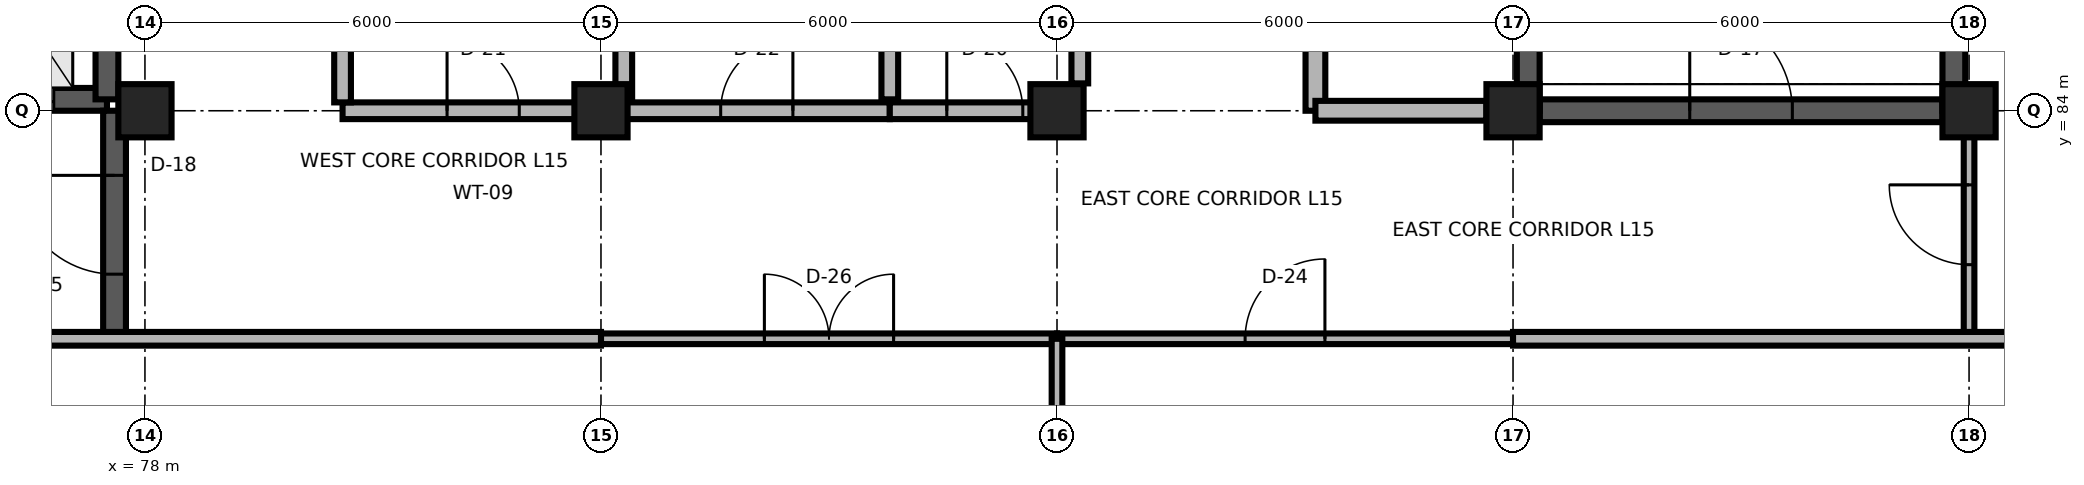
"""IFC4 building model, lengths in metres.
Left out: names, types, materials, properties, quantities, classifications, styles, units other than length and angle.
Written with IfcOpenShell. Run it as: python <this file> out.ifc"""

import sys

from ifc_helpers import new_model, si_unit, direction, frame, frame_2d, origin, origin_2d, place, context, subcontext, project, spatial, rectangle, extrude, element, fill, save


model = new_model("IFC4")
c1 = context("Model", 3, precision=1e-05, world=origin(), true_north=direction((0.0, 1.0)))
c2 = subcontext(c1, "Body", "Model", "MODEL_VIEW")
j1 = project(units=[si_unit("LENGTHUNIT", "METRE"), si_unit("PLANEANGLEUNIT", "RADIAN")], contexts=[c1])
p1 = place(None, origin())
s1 = spatial("IfcSite", under=j1, at=p1, CompositionType="ELEMENT")
p2 = place(p1, origin())
s2 = spatial("IfcBuilding", under=s1, at=p2, CompositionType="ELEMENT")
p3 = place(p2, frame((0.0, 0.0, 60.0)))
s3 = spatial("IfcBuildingStorey", under=s2, at=p3, CompositionType="ELEMENT", Elevation=60.0)
for number, where, z_axis, x_axis in (
    (1, (78.0, 84.0, 0.0), (0.0, 0.0, 1.0), (1.0, 0.0, 0.0)),
    (2, (84.0, 84.0, 0.0), (0.0, 0.0, 1.0), (1.0, 0.0, 0.0)),
    (3, (90.0, 84.0, 0.0), (0.0, 0.0, 1.0), (1.0, 0.0, 0.0)),
    (4, (96.0, 84.0, 0.0), (0.0, 0.0, 1.0), (1.0, 0.0, 0.0)),
    (5, (102.0, 84.0, 0.0), (0.0, 0.0, 1.0), (1.0, 0.0, 0.0)),
):
    element("IfcColumn", number, at=place(p3, frame(where, z_axis=z_axis, x_axis=x_axis)), inside=s3, PredefinedType="COLUMN", context=c2, shape_type="SweptSolid", body=[
        extrude(rectangle(XDim=0.7, YDim=0.7, at=origin_2d()), origin(), (0.0, 0.0, 1.0), 3.9),
    ])
p4 = place(p3, frame((96.35, 84.0, 0.0), z_axis=(0.0, 0.0, 1.0), x_axis=(1.0, 0.0, 0.0)))
e6 = element("IfcWall", 6, at=p4, inside=s3, PredefinedType="SHEAR", context=c2, shape_type="SweptSolid", body=[
    extrude(rectangle(XDim=5.3, YDim=0.3, at=frame_2d((2.65, 0.0))), origin(), (0.0, 0.0, 1.0), 3.66),
])
p5 = place(p4, frame((1.975, 0.0, 0.0)))
e7 = element("IfcOpeningElement", 7, at=p5, cuts=e6, PredefinedType="OPENING", context=c2, shape_type="SweptSolid", body=[
    extrude(rectangle(XDim=1.35, YDim=2.2, at=frame_2d((0.675, 1.1))), frame((0.0, 0.165, 0.0), z_axis=(0.0, -1.0, 0.0), x_axis=(1.0, 0.0, 0.0)), (0.0, 0.0, 1.0), 0.33),
])
for number, where, z_axis, x_axis in (
    (8, (96.2, 84.0, 0.0), (0.0, 0.0, 1.0), (0.0, 1.0, 0.0)),
    (9, (101.8, 84.0, 0.0), (0.0, 0.0, 1.0), (0.0, 1.0, 0.0)),
):
    element("IfcWall", number, at=place(p3, frame(where, z_axis=z_axis, x_axis=x_axis)), inside=s3, PredefinedType="SHEAR", context=c2, shape_type="SweptSolid", body=[
        extrude(rectangle(XDim=11.8, YDim=0.3, at=frame_2d((5.9, 0.0))), origin(), (0.0, 0.0, 1.0), 3.74),
    ])
p6 = place(p3, frame((75.0, 84.15, 0.0), z_axis=(0.0, 0.0, 1.0), x_axis=(1.0, 0.0, 0.0)))
e10 = element("IfcWall", 10, at=p6, inside=s3, PredefinedType="SHEAR", context=c2, shape_type="SweptSolid", body=[
    extrude(rectangle(XDim=2.5, YDim=0.3, at=frame_2d((1.25, 0.0))), origin(), (0.0, 0.0, 1.0), 3.74),
])
p7 = place(p6, frame((0.7, 0.0, 0.0)))
e11 = element("IfcOpeningElement", 11, at=p7, cuts=e10, PredefinedType="OPENING", context=c2, shape_type="SweptSolid", body=[
    extrude(rectangle(XDim=1.1, YDim=2.1, at=frame_2d((0.55, 1.05))), frame((0.0, 0.165, 0.0), z_axis=(0.0, -1.0, 0.0), x_axis=(1.0, 0.0, 0.0)), (0.0, 0.0, 1.0), 0.33),
])
p8 = place(p3, frame((77.5, 84.15, 0.0), z_axis=(0.0, 0.0, 1.0), x_axis=(0.0, 1.0, 0.0)))
e12 = element("IfcWall", 12, at=p8, inside=s3, PredefinedType="SHEAR", context=c2, shape_type="SweptSolid", body=[
    extrude(rectangle(XDim=3.4, YDim=0.3, at=frame_2d((1.7, 0.0))), origin(), (0.0, 0.0, 1.0), 3.74),
])
p9 = place(p3, frame((93.4, 84.0, 0.0), z_axis=(0.0, 0.0, 1.0), x_axis=(0.0, 1.0, 0.0)))
e13 = element("IfcWall", 13, at=p9, inside=s3, PredefinedType="PARTITIONING", context=c2, shape_type="SweptSolid", body=[
    extrude(rectangle(XDim=11.96, YDim=0.26, at=frame_2d((5.98, 0.0))), origin(), (0.0, 0.0, 1.0), 3.74),
])
p10 = place(p9, frame((3.425, 0.0, 0.0)))
e14 = element("IfcOpeningElement", 14, at=p10, cuts=e13, PredefinedType="OPENING", context=c2, shape_type="SweptSolid", body=[
    extrude(rectangle(XDim=1.15, YDim=2.2, at=frame_2d((0.575, 1.1))), frame((0.0, 0.145, 0.0), z_axis=(0.0, -1.0, 0.0), x_axis=(1.0, 0.0, 0.0)), (0.0, 0.0, 1.0), 0.29),
])
p11 = place(p3, frame((93.4, 84.0, 0.0), z_axis=(0.0, 0.0, 1.0), x_axis=(1.0, 0.0, 0.0)))
e15 = element("IfcWall", 15, at=p11, inside=s3, PredefinedType="PARTITIONING", context=c2, shape_type="SweptSolid", body=[
    extrude(rectangle(XDim=2.25, YDim=0.26, at=frame_2d((1.125, 0.0))), origin(), (0.0, 0.0, 1.0), 3.449),
])
p12 = place(p3, frame((77.6, 81.0, 0.0), z_axis=(0.0, 0.0, 1.0), x_axis=(0.0, 1.0, 0.0)))
e16 = element("IfcWall", 16, at=p12, inside=s3, PredefinedType="SHEAR", context=c2, shape_type="SweptSolid", body=[
    extrude(rectangle(XDim=3.0, YDim=0.3, at=frame_2d((1.5, 0.0))), origin(), (0.0, 0.0, 1.0), 3.74),
])
p13 = place(p12, frame((0.85, 0.0, 0.0)))
e17 = element("IfcOpeningElement", 17, at=p13, cuts=e16, PredefinedType="OPENING", context=c2, shape_type="SweptSolid", body=[
    extrude(rectangle(XDim=1.3, YDim=2.2, at=frame_2d((0.65, 1.1))), frame((0.0, 0.165, 0.0), z_axis=(0.0, -1.0, 0.0), x_axis=(1.0, 0.0, 0.0)), (0.0, 0.0, 1.0), 0.33),
])
p14 = place(p3, frame((80.6, 84.0, 0.0), z_axis=(0.0, 0.0, 1.0), x_axis=(1.0, 0.0, 0.0)))
e18 = element("IfcWall", 18, at=p14, inside=s3, PredefinedType="PARTITIONING", context=c2, shape_type="SweptSolid", body=[
    extrude(rectangle(XDim=3.7, YDim=0.22, at=frame_2d((1.85, 0.0))), origin(), (0.0, 0.0, 1.0), 3.449),
])
p15 = place(p14, frame((1.375, 0.0, 0.0)))
e19 = element("IfcOpeningElement", 19, at=p15, cuts=e18, PredefinedType="OPENING", context=c2, shape_type="SweptSolid", body=[
    extrude(rectangle(XDim=0.95, YDim=2.15, at=frame_2d((0.475, 1.075))), frame((0.0, 0.125, 0.0), z_axis=(0.0, -1.0, 0.0), x_axis=(1.0, 0.0, 0.0)), (0.0, 0.0, 1.0), 0.25),
])
p16 = place(p3, frame((84.3, 84.0, 0.0), z_axis=(0.0, 0.0, 1.0), x_axis=(1.0, 0.0, 0.0)))
e20 = element("IfcWall", 20, at=p16, inside=s3, PredefinedType="PARTITIONING", context=c2, shape_type="SweptSolid", body=[
    extrude(rectangle(XDim=3.5, YDim=0.22, at=frame_2d((1.75, 0.0))), origin(), (0.0, 0.0, 1.0), 3.449),
])
p17 = place(p16, frame((1.275, 0.0, 0.0)))
e21 = element("IfcOpeningElement", 21, at=p17, cuts=e20, PredefinedType="OPENING", context=c2, shape_type="SweptSolid", body=[
    extrude(rectangle(XDim=0.95, YDim=2.1, at=frame_2d((0.475, 1.05))), frame((0.0, 0.125, 0.0), z_axis=(0.0, -1.0, 0.0), x_axis=(1.0, 0.0, 0.0)), (0.0, 0.0, 1.0), 0.25),
])
p18 = place(p3, frame((87.8, 84.0, 0.0), z_axis=(0.0, 0.0, 1.0), x_axis=(1.0, 0.0, 0.0)))
e22 = element("IfcWall", 22, at=p18, inside=s3, PredefinedType="PARTITIONING", context=c2, shape_type="SweptSolid", body=[
    extrude(rectangle(XDim=2.5, YDim=0.22, at=frame_2d((1.25, 0.0))), origin(), (0.0, 0.0, 1.0), 3.449),
])
p19 = place(p18, frame((0.75, 0.0, 0.0)))
e23 = element("IfcOpeningElement", 23, at=p19, cuts=e22, PredefinedType="OPENING", context=c2, shape_type="SweptSolid", body=[
    extrude(rectangle(XDim=1.0, YDim=2.15, at=frame_2d((0.5, 1.075))), frame((0.0, 0.125, 0.0), z_axis=(0.0, -1.0, 0.0), x_axis=(1.0, 0.0, 0.0)), (0.0, 0.0, 1.0), 0.25),
])
for number, where, z_axis, x_axis in (
    (24, (84.3, 84.15, 0.0), (0.0, 0.0, 1.0), (0.0, 1.0, 0.0)),
    (25, (87.8, 84.15, 0.0), (0.0, 0.0, 1.0), (0.0, 1.0, 0.0)),
):
    element("IfcWall", number, at=place(p3, frame(where, z_axis=z_axis, x_axis=x_axis)), inside=s3, PredefinedType="PARTITIONING", context=c2, shape_type="SweptSolid", body=[
        extrude(rectangle(XDim=5.0, YDim=0.22, at=frame_2d((2.5, 0.0))), origin(), (0.0, 0.0, 1.0), 3.74),
    ])
p20 = place(p3, frame((102.0, 81.05, 0.0), z_axis=(0.0, 0.0, 1.0), x_axis=(0.0, 1.0, 0.0)))
e26 = element("IfcWall", 26, at=p20, inside=s3, PredefinedType="PARTITIONING", context=c2, shape_type="SweptSolid", body=[
    extrude(rectangle(XDim=2.9, YDim=0.14, at=frame_2d((1.45, 0.0))), origin(), (0.0, 0.0, 1.0), 3.449),
])
p21 = place(p20, frame((0.925, 0.0, 0.0)))
e27 = element("IfcOpeningElement", 27, at=p21, cuts=e26, PredefinedType="OPENING", context=c2, shape_type="SweptSolid", body=[
    extrude(rectangle(XDim=1.05, YDim=2.25, at=frame_2d((0.525, 1.125))), frame((0.0, 0.085, 0.0), z_axis=(0.0, -1.0, 0.0), x_axis=(1.0, 0.0, 0.0)), (0.0, 0.0, 1.0), 0.17),
])
p22 = place(p3, frame((84.0, 81.0, 0.0), z_axis=(0.0, 0.0, 1.0), x_axis=(1.0, 0.0, 0.0)))
e28 = element("IfcWall", 28, at=p22, inside=s3, PredefinedType="PARTITIONING", context=c2, shape_type="SweptSolid", body=[
    extrude(rectangle(XDim=6.0, YDim=0.14, at=frame_2d((3.0, 0.0))), origin(), (0.0, 0.0, 1.0), 3.74),
])
p23 = place(p22, frame((2.15, 0.0, 0.0)))
e29 = element("IfcOpeningElement", 29, at=p23, cuts=e28, PredefinedType="OPENING", context=c2, shape_type="SweptSolid", body=[
    extrude(rectangle(XDim=1.7, YDim=2.45, at=frame_2d((0.85, 1.225))), frame((0.0, 0.085, 0.0), z_axis=(0.0, -1.0, 0.0), x_axis=(1.0, 0.0, 0.0)), (0.0, 0.0, 1.0), 0.17),
])
p24 = place(p3, frame((90.0, 81.0, 0.0), z_axis=(0.0, 0.0, 1.0), x_axis=(1.0, 0.0, 0.0)))
e30 = element("IfcWall", 30, at=p24, inside=s3, PredefinedType="PARTITIONING", context=c2, shape_type="SweptSolid", body=[
    extrude(rectangle(XDim=6.0, YDim=0.14, at=frame_2d((3.0, 0.0))), origin(), (0.0, 0.0, 1.0), 3.74),
])
p25 = place(p24, frame((2.475, 0.0, 0.0)))
e31 = element("IfcOpeningElement", 31, at=p25, cuts=e30, PredefinedType="OPENING", context=c2, shape_type="SweptSolid", body=[
    extrude(rectangle(XDim=1.05, YDim=2.25, at=frame_2d((0.525, 1.125))), frame((0.0, 0.085, 0.0), z_axis=(0.0, -1.0, 0.0), x_axis=(1.0, 0.0, 0.0)), (0.0, 0.0, 1.0), 0.17),
])
p26 = place(p3, frame((90.0, 78.35, 0.0), z_axis=(0.0, 0.0, 1.0), x_axis=(0.0, 1.0, 0.0)))
e32 = element("IfcWall", 32, at=p26, inside=s3, PredefinedType="PARTITIONING", context=c2, shape_type="SweptSolid", body=[
    extrude(rectangle(XDim=2.65, YDim=0.14, at=frame_2d((1.325, 0.0))), origin(), (0.0, 0.0, 1.0), 3.449),
])
p27 = place(p3, frame((80.6, 84.11, 0.0), z_axis=(0.0, 0.0, 1.0), x_axis=(0.0, 1.0, 0.0)))
e33 = element("IfcWall", 33, at=p27, inside=s3, PredefinedType="PARTITIONING", context=c2, shape_type="SweptSolid", body=[
    extrude(rectangle(XDim=4.98, YDim=0.22, at=frame_2d((2.49, 0.0))), origin(), (0.0, 0.0, 1.0), 3.74),
])
p28 = place(p3, frame((90.3, 84.36, 0.0), z_axis=(0.0, 0.0, 1.0), x_axis=(0.0, 1.0, 0.0)))
e34 = element("IfcWall", 34, at=p28, inside=s3, PredefinedType="PARTITIONING", context=c2, shape_type="SweptSolid", body=[
    extrude(rectangle(XDim=4.73, YDim=0.22, at=frame_2d((2.365, 0.0))), origin(), (0.0, 0.0, 1.0), 3.74),
])
p29 = place(p3, frame((72.0, 81.0, 0.0), z_axis=(0.0, 0.0, 1.0), x_axis=(1.0, 0.0, 0.0)))
e35 = element("IfcWall", 35, at=p29, inside=s3, PredefinedType="PARTITIONING", context=c2, shape_type="SweptSolid", body=[
    extrude(rectangle(XDim=12.0, YDim=0.18, at=frame_2d((6.0, 0.0))), origin(), (0.0, 0.0, 1.0), 3.74),
])
p30 = place(p3, frame((96.0, 81.0, 0.0), z_axis=(0.0, 0.0, 1.0), x_axis=(1.0, 0.0, 0.0)))
e36 = element("IfcWall", 36, at=p30, inside=s3, PredefinedType="PARTITIONING", context=c2, shape_type="SweptSolid", body=[
    extrude(rectangle(XDim=10.3, YDim=0.18, at=frame_2d((5.15, 0.0))), origin(), (0.0, 0.0, 1.0), 3.74),
])
p31 = place(p5, origin())
e37 = element("IfcDoor", 37, at=p31, inside=s3, OperationType="SINGLE_SWING_LEFT", PredefinedType="DOOR", context=c2, shape_type="SweptSolid", body=[
    extrude(rectangle(XDim=1.35, YDim=2.2, at=frame_2d((0.675, 1.1))), frame((0.0, 0.025, 0.0), z_axis=(0.0, -1.0, 0.0), x_axis=(1.0, 0.0, 0.0)), (0.0, 0.0, 1.0), 0.05),
])
fill(e7, e37)
p32 = place(p7, origin())
e38 = element("IfcDoor", 38, at=p32, inside=s3, OperationType="DOUBLE_DOOR_SLIDING", PredefinedType="DOOR", context=c2, shape_type="SweptSolid", body=[
    extrude(rectangle(XDim=1.1, YDim=2.1, at=frame_2d((0.55, 1.05))), frame((0.0, 0.025, 0.0), z_axis=(0.0, -1.0, 0.0), x_axis=(1.0, 0.0, 0.0)), (0.0, 0.0, 1.0), 0.05),
])
fill(e11, e38)
p33 = place(p13, origin())
e39 = element("IfcDoor", 39, at=p33, inside=s3, OperationType="SINGLE_SWING_RIGHT", PredefinedType="DOOR", context=c2, shape_type="SweptSolid", body=[
    extrude(rectangle(XDim=1.3, YDim=2.2, at=frame_2d((0.65, 1.1))), frame((0.0, 0.025, 0.0), z_axis=(0.0, -1.0, 0.0), x_axis=(1.0, 0.0, 0.0)), (0.0, 0.0, 1.0), 0.05),
])
fill(e17, e39)
p34 = place(p15, origin())
e40 = element("IfcDoor", 40, at=p34, inside=s3, OperationType="SINGLE_SWING_LEFT", PredefinedType="DOOR", context=c2, shape_type="SweptSolid", body=[
    extrude(rectangle(XDim=0.95, YDim=2.15, at=frame_2d((0.475, 1.075))), frame((0.0, 0.025, 0.0), z_axis=(0.0, -1.0, 0.0), x_axis=(1.0, 0.0, 0.0)), (0.0, 0.0, 1.0), 0.05),
])
fill(e19, e40)
p35 = place(p17, origin())
e41 = element("IfcDoor", 41, at=p35, inside=s3, OperationType="SINGLE_SWING_RIGHT", PredefinedType="DOOR", context=c2, shape_type="SweptSolid", body=[
    extrude(rectangle(XDim=0.95, YDim=2.1, at=frame_2d((0.475, 1.05))), frame((0.0, 0.025, 0.0), z_axis=(0.0, -1.0, 0.0), x_axis=(1.0, 0.0, 0.0)), (0.0, 0.0, 1.0), 0.05),
])
fill(e21, e41)
p36 = place(p19, origin())
e42 = element("IfcDoor", 42, at=p36, inside=s3, OperationType="SINGLE_SWING_LEFT", PredefinedType="DOOR", context=c2, shape_type="SweptSolid", body=[
    extrude(rectangle(XDim=1.0, YDim=2.15, at=frame_2d((0.5, 1.075))), frame((0.0, 0.025, 0.0), z_axis=(0.0, -1.0, 0.0), x_axis=(1.0, 0.0, 0.0)), (0.0, 0.0, 1.0), 0.05),
])
fill(e23, e42)
p37 = place(p21, origin())
e43 = element("IfcDoor", 43, at=p37, inside=s3, OperationType="SINGLE_SWING_RIGHT", PredefinedType="DOOR", context=c2, shape_type="SweptSolid", body=[
    extrude(rectangle(XDim=1.05, YDim=2.25, at=frame_2d((0.525, 1.125))), frame((0.0, 0.025, 0.0), z_axis=(0.0, -1.0, 0.0), x_axis=(1.0, 0.0, 0.0)), (0.0, 0.0, 1.0), 0.05),
])
fill(e27, e43)
p38 = place(p23, origin())
e44 = element("IfcDoor", 44, at=p38, inside=s3, OperationType="DOUBLE_DOOR_SINGLE_SWING", PredefinedType="DOOR", context=c2, shape_type="SweptSolid", body=[
    extrude(rectangle(XDim=1.7, YDim=2.45, at=frame_2d((0.85, 1.225))), frame((0.0, 0.025, 0.0), z_axis=(0.0, -1.0, 0.0), x_axis=(1.0, 0.0, 0.0)), (0.0, 0.0, 1.0), 0.05),
])
fill(e29, e44)
p39 = place(p25, origin())
e45 = element("IfcDoor", 45, at=p39, inside=s3, OperationType="SINGLE_SWING_RIGHT", PredefinedType="DOOR", context=c2, shape_type="SweptSolid", body=[
    extrude(rectangle(XDim=1.05, YDim=2.25, at=frame_2d((0.525, 1.125))), frame((0.0, 0.025, 0.0), z_axis=(0.0, -1.0, 0.0), x_axis=(1.0, 0.0, 0.0)), (0.0, 0.0, 1.0), 0.05),
])
fill(e31, e45)
save(model, sys.argv[1])
